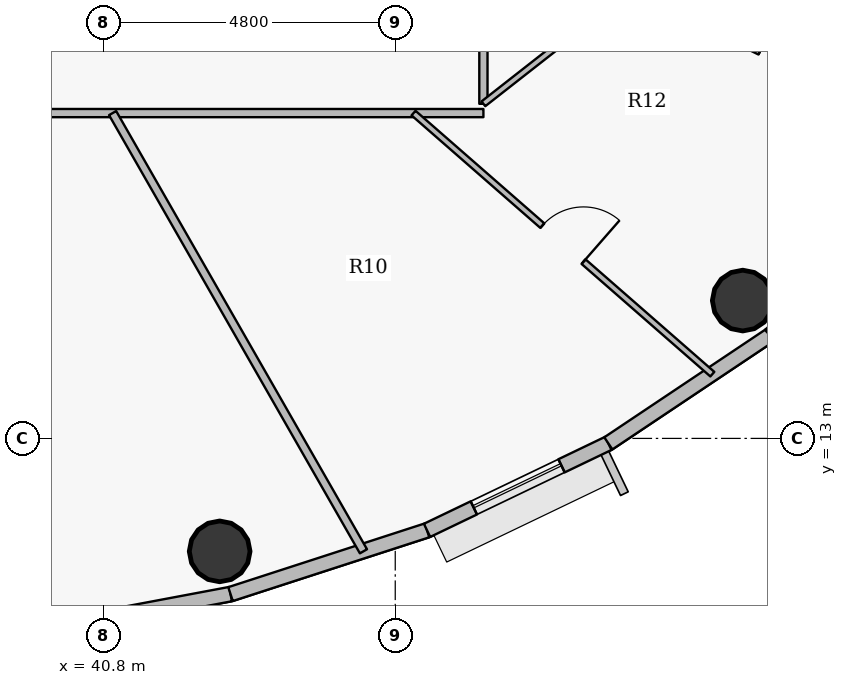
"""IFC4 building model, lengths in metres.
Left out: names, types, materials, properties, quantities, classifications, styles, units other than length and angle.
Written with IfcOpenShell. Run it as: python <this file> out.ifc"""

import sys

from ifc_helpers import new_model, si_unit, direction, frame, frame_2d, origin, origin_2d, place, context, subcontext, project, spatial, rectangle, hollow_circle, extrude, source, transform, mapped, element, fill, save


model = new_model("IFC4")
c1 = context("Model", 3, precision=1e-05, world=origin(), true_north=direction((0.0, 1.0)))
c2 = subcontext(c1, "Body", "Model", "MODEL_VIEW")
j1 = project(units=[si_unit("LENGTHUNIT", "METRE"), si_unit("PLANEANGLEUNIT", "RADIAN")], contexts=[c1])
p1 = place(None, origin())
s1 = spatial("IfcSite", under=j1, at=p1, CompositionType="ELEMENT")
p2 = place(p1, origin())
s2 = spatial("IfcBuilding", under=s1, at=p2, CompositionType="ELEMENT")
p3 = place(p2, frame((0.0, 0.0, 280.5)))
s3 = spatial("IfcBuildingStorey", under=s2, at=p3, CompositionType="ELEMENT", Elevation=280.5)
for number, where, z_axis, x_axis in (
    (1, (42.712, 11.142, 0.0), (0.0, 0.0, 1.0), (1.0, 0.0, 0.0)),
    (2, (51.315, 15.267, 0.0), (0.0, 0.0, 1.0), (1.0, 0.0, 0.0)),
):
    element("IfcColumn", number, at=place(p3, frame(where, z_axis=z_axis, x_axis=x_axis)), inside=s3, PredefinedType="COLUMN", context=c2, shape_type="SweptSolid", body=[
        extrude(hollow_circle(Radius=0.5, WallThickness=0.032, at=origin_2d()), origin(), (0.0, 0.0, 1.0), 3.75),
    ])
p4 = place(p3, frame((42.891, 10.44, 0.0), z_axis=(0.0, 0.0, 1.0), x_axis=(-0.982782655757, -0.184765395959, 0.0)))
e3 = element("IfcWall", 3, at=p4, inside=s3, PredefinedType="SOLIDWALL", context=c2, shape_type="SweptSolid", body=[
    extrude(rectangle(XDim=3.462, YDim=0.24, at=frame_2d((1.731, 0.0))), origin(), (0.0, 0.0, 1.0), 3.5),
])
p5 = place(p3, frame((46.123, 11.488, 0.0), z_axis=(0.0, 0.0, 1.0), x_axis=(-0.95123136723, -0.308478339592, 0.0)))
e4 = element("IfcWall", 4, at=p5, inside=s3, PredefinedType="SOLIDWALL", context=c2, shape_type="SweptSolid", body=[
    extrude(rectangle(XDim=3.398, YDim=0.24, at=frame_2d((1.699, 0.0))), origin(), (0.0, 0.0, 1.0), 3.5),
])
p6 = place(p3, frame((49.104, 12.918, 0.0), z_axis=(0.0, 0.0, 1.0), x_axis=(-0.901573741254, -0.43262546051, 0.0)))
e5 = element("IfcWall", 5, at=p6, inside=s3, PredefinedType="SOLIDWALL", context=c2, shape_type="SweptSolid", body=[
    extrude(rectangle(XDim=3.307, YDim=0.24, at=frame_2d((1.653, 0.0))), origin(), (0.0, 0.0, 1.0), 3.5),
])
p7 = place(p6, frame((0.854, 0.0, 0.9)))
e6 = element("IfcOpeningElement", 6, at=p7, cuts=e5, PredefinedType="OPENING", context=c2, shape_type="SweptSolid", body=[
    extrude(rectangle(XDim=1.6, YDim=1.75, at=origin_2d()), frame((0.8, 0.13, 0.875), z_axis=(0.0, -1.0, 0.0), x_axis=(1.0, 0.0, 0.0)), (0.0, 0.0, 1.0), 0.26),
])
p8 = place(p3, frame((51.762, 14.696, 0.0), z_axis=(0.0, 0.0, 1.0), x_axis=(-0.831250592635, -0.55589787933, 0.0)))
e7 = element("IfcWall", 7, at=p8, inside=s3, PredefinedType="SOLIDWALL", context=c2, shape_type="SweptSolid", body=[
    extrude(rectangle(XDim=3.197, YDim=0.24, at=frame_2d((1.599, 0.0))), origin(), (0.0, 0.0, 1.0), 3.5),
])
p9 = place(p3, frame((54.03, 16.775, 0.0), z_axis=(0.0, 0.0, 1.0), x_axis=(-0.737068506972, -0.675818034703, 0.0)))
e8 = element("IfcWall", 8, at=p9, inside=s3, PredefinedType="SOLIDWALL", context=c2, shape_type="SweptSolid", body=[
    extrude(rectangle(XDim=3.077, YDim=0.24, at=frame_2d((1.539, 0.0))), origin(), (0.0, 0.0, 1.0), 3.5),
])
p10 = place(p3, frame((36.95, 18.35, 0.0), z_axis=(0.0, 0.0, 1.0), x_axis=(1.0, 0.0, 0.0)))
e9 = element("IfcWall", 9, at=p10, inside=s3, PredefinedType="PARTITIONING", context=c2, shape_type="SweptSolid", body=[
    extrude(rectangle(XDim=10.1, YDim=0.135, at=frame_2d((5.05, 0.0))), origin(), (0.0, 0.0, 1.0), 3.035),
])
p11 = place(p10, frame((1.521, 0.0, 0.0)))
e10 = element("IfcOpeningElement", 10, at=p11, cuts=e9, PredefinedType="OPENING", context=c2, shape_type="SweptSolid", body=[
    extrude(rectangle(XDim=1.0, YDim=2.15, at=origin_2d()), frame((0.5, 0.078, 1.075), z_axis=(0.0, -1.0, 0.0), x_axis=(1.0, 0.0, 0.0)), (0.0, 0.0, 1.0), 0.155),
])
p12 = place(p3, frame((40.952, 18.35, 0.0), z_axis=(0.0, 0.0, 1.0), x_axis=(0.496803688517, -0.867862947173, 0.0)))
e11 = element("IfcWall", 11, at=p12, inside=s3, PredefinedType="PARTITIONING", context=c2, shape_type="SweptSolid", body=[
    extrude(rectangle(XDim=8.304, YDim=0.135, at=frame_2d((4.152, 0.0))), origin(), (0.0, 0.0, 1.0), 2.985),
])
p13 = place(p3, frame((45.901, 18.35, 0.0), z_axis=(0.0, 0.0, 1.0), x_axis=(0.753056223084, -0.657956172457, 0.0)))
e12 = element("IfcWall", 12, at=p13, inside=s3, PredefinedType="PARTITIONING", context=c2, shape_type="SweptSolid", body=[
    extrude(rectangle(XDim=6.526, YDim=0.1, at=frame_2d((3.263, 0.0))), origin(), (0.0, 0.0, 1.0), 2.985),
])
p14 = place(p13, frame((2.813, 0.0, 0.0)))
e13 = element("IfcOpeningElement", 13, at=p14, cuts=e12, PredefinedType="OPENING", context=c2, shape_type="SweptSolid", body=[
    extrude(rectangle(XDim=0.9, YDim=2.1, at=origin_2d()), frame((0.45, 0.06, 1.05), z_axis=(0.0, -1.0, 0.0), x_axis=(1.0, 0.0, 0.0)), (0.0, 0.0, 1.0), 0.12),
])
p15 = place(p3, frame((47.05, 18.503, 0.0), z_axis=(0.0, 0.0, 1.0), x_axis=(0.0, 1.0, 0.0)))
e14 = element("IfcWall", 14, at=p15, inside=s3, PredefinedType="PARTITIONING", context=c2, shape_type="SweptSolid", body=[
    extrude(rectangle(XDim=17.147, YDim=0.135, at=frame_2d((8.574, 0.0))), origin(), (0.0, 0.0, 1.0), 3.035),
])
p16 = place(p15, frame((4.545, 0.0, 0.0)))
e15 = element("IfcOpeningElement", 15, at=p16, cuts=e14, PredefinedType="OPENING", context=c2, shape_type="SweptSolid", body=[
    extrude(rectangle(XDim=1.0, YDim=2.15, at=origin_2d()), frame((0.5, 0.078, 1.075), z_axis=(0.0, -1.0, 0.0), x_axis=(1.0, 0.0, 0.0)), (0.0, 0.0, 1.0), 0.155),
])
p17 = place(p3, frame((47.05, 18.503, 0.0), z_axis=(0.0, 0.0, 1.0), x_axis=(0.787328855274, 0.616533270516, 0.0)))
e16 = element("IfcWall", 16, at=p17, inside=s3, PredefinedType="PARTITIONING", context=c2, shape_type="SweptSolid", body=[
    extrude(rectangle(XDim=2.077, YDim=0.1, at=frame_2d((1.039, 0.0))), origin(), (0.0, 0.0, 1.0), 3.035),
])
p18 = place(p3, frame((49.179, 20.542, 0.0), z_axis=(0.0, 0.0, 1.0), x_axis=(0.89799659679, -0.440002400167, 0.0)))
e17 = element("IfcWall", 17, at=p18, inside=s3, PredefinedType="PARTITIONING", context=c2, shape_type="SweptSolid", body=[
    extrude(rectangle(XDim=6.283, YDim=0.1, at=frame_2d((3.141, 0.0))), origin(), (0.0, 0.0, 1.0), 2.985),
])
p19 = place(p18, frame((2.691, 0.0, 0.0)))
e18 = element("IfcOpeningElement", 18, at=p19, cuts=e17, PredefinedType="OPENING", context=c2, shape_type="SweptSolid", body=[
    extrude(rectangle(XDim=0.9, YDim=2.1, at=origin_2d()), frame((0.45, 0.06, 1.05), z_axis=(0.0, -1.0, 0.0), x_axis=(1.0, 0.0, 0.0)), (0.0, 0.0, 1.0), 0.12),
])
m1 = source(origin(), c2, "Body", "SweptSolid", [
    extrude(rectangle(XDim=1.6, YDim=1.75, at=origin_2d()), frame((0.8, 0.03, 0.875), z_axis=(0.0, -1.0, 0.0), x_axis=(1.0, 0.0, 0.0)), (0.0, 0.0, 1.0), 0.06),
])
p20 = place(p7, origin())
e19 = element("IfcWindow", 19, at=p20, inside=s3, PartitioningType="DOUBLE_PANEL_VERTICAL", PredefinedType="WINDOW", context=c2, shape_type="MappedRepresentation", body=[
    mapped(m1, transform((0.0, 0.0, 0.0), x_axis=(1.0, 0.0, 0.0), y_axis=(0.0, 1.0, 0.0), z_axis=(0.0, 0.0, 1.0), scale=1.0)),
])
fill(e6, e19)
m2 = source(origin(), c2, "Body", "SweptSolid", [
    extrude(rectangle(XDim=0.9, YDim=2.1, at=origin_2d()), frame((0.45, 0.025, 1.05), z_axis=(0.0, -1.0, 0.0), x_axis=(1.0, 0.0, 0.0)), (0.0, 0.0, 1.0), 0.05),
])
p21 = place(p19, origin())
e20 = element("IfcDoor", 20, at=p21, inside=s3, OperationType="SINGLE_SWING_LEFT", PredefinedType="DOOR", context=c2, shape_type="MappedRepresentation", body=[
    mapped(m2, transform((0.0, 0.0, 0.0), x_axis=(1.0, 0.0, 0.0), y_axis=(0.0, 1.0, 0.0), z_axis=(0.0, 0.0, 1.0), scale=1.0)),
])
fill(e18, e20)
p22 = place(p14, origin())
e21 = element("IfcDoor", 21, at=p22, inside=s3, OperationType="SINGLE_SWING_RIGHT", PredefinedType="DOOR", context=c2, shape_type="MappedRepresentation", body=[
    mapped(m2, transform((0.0, 0.0, 0.0), x_axis=(1.0, 0.0, 0.0), y_axis=(0.0, 1.0, 0.0), z_axis=(0.0, 0.0, 1.0), scale=1.0)),
])
fill(e13, e21)
save(model, sys.argv[1])
